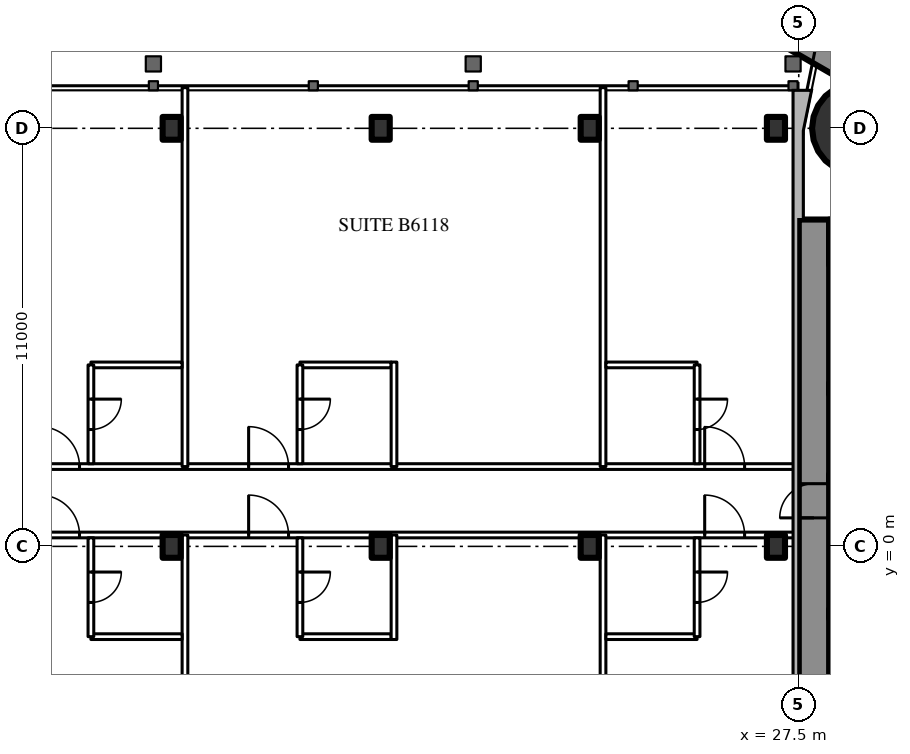
"""IFC4 building model, lengths in metres.
Left out: names, types, materials, properties, quantities, classifications, styles, units other than length and angle.
Written with IfcOpenShell. Run it as: python <this file> out.ifc"""

import sys

from ifc_helpers import new_model, si_unit, direction, frame, frame_2d, origin, origin_2d, place, context, subcontext, project, spatial, rectangle, circle, i_section, extrude, element, fill, save


model = new_model("IFC4")
c1 = context("Model", 3, precision=1e-05, world=origin(), true_north=direction((0.0, 1.0)))
c2 = subcontext(c1, "Body", "Model", "MODEL_VIEW")
j1 = project(units=[si_unit("LENGTHUNIT", "METRE"), si_unit("PLANEANGLEUNIT", "RADIAN")], contexts=[c1])
p1 = place(None, origin())
s1 = spatial("IfcSite", under=j1, at=p1, CompositionType="ELEMENT")
p2 = place(p1, origin())
s2 = spatial("IfcBuilding", under=s1, at=p2, CompositionType="ELEMENT")
p3 = place(p2, frame((0.0, 0.0, 229.7)))
s3 = spatial("IfcBuildingStorey", under=s2, at=p3, CompositionType="ELEMENT", Elevation=229.7)
p4 = place(p3, frame((29.05, 11.0, 0.0), z_axis=(0.0, 0.0, 1.0), x_axis=(1.0, 0.0, 0.0)))
e1 = element("IfcColumn", 1, at=p4, inside=s3, PredefinedType="COLUMN", context=c2, shape_type="SweptSolid", body=[
    extrude(circle(Radius=1.2, at=origin_2d()), origin(), (0.0, 0.0, 1.0), 3.6),
])
p5 = place(p3, frame((27.9, -8.6, 0.0), z_axis=(0.0, 0.0, 1.0), x_axis=(0.0, 1.0, 0.0)))
e2 = element("IfcWall", 2, at=p5, inside=s3, PredefinedType="SHEAR", context=c2, shape_type="SweptSolid", body=[
    extrude(rectangle(XDim=17.2, YDim=0.8, at=frame_2d((8.6, 0.0))), origin(), (0.0, 0.0, 1.0), 3.6),
])
p6 = place(p5, frame((9.35, 0.0, 0.0)))
e3 = element("IfcOpeningElement", 3, at=p6, cuts=e2, PredefinedType="OPENING", context=c2, shape_type="SweptSolid", body=[
    extrude(rectangle(XDim=0.9, YDim=2.2, at=frame_2d((0.45, 1.1))), frame((0.0, 0.41, 0.0), z_axis=(0.0, -1.0, 0.0), x_axis=(1.0, 0.0, 0.0)), (0.0, 0.0, 1.0), 0.82),
])
p7 = place(p3, frame((28.3, 8.0, 0.0), z_axis=(0.0, 0.0, 1.0), x_axis=(1.0, 0.0, 0.0)))
e4 = element("IfcWall", 4, at=p7, inside=s3, PredefinedType="SHEAR", context=c2, shape_type="SweptSolid", body=[
    extrude(rectangle(XDim=8.4, YDim=1.2, at=frame_2d((4.2, 0.0))), origin(), (0.0, 0.0, 1.0), 3.6),
])
p8 = place(p7, frame((0.25, 0.0, 0.0)))
e5 = element("IfcOpeningElement", 5, at=p8, cuts=e4, PredefinedType="OPENING", context=c2, shape_type="SweptSolid", body=[
    extrude(rectangle(XDim=1.0, YDim=2.2, at=frame_2d((0.5, 1.1))), frame((0.0, 0.61, 0.0), z_axis=(0.0, -1.0, 0.0), x_axis=(1.0, 0.0, 0.0)), (0.0, 0.0, 1.0), 1.22),
])
p9 = place(p3, frame((28.3, 4.15, 0.0), z_axis=(0.0, 0.0, 1.0), x_axis=(1.0, 0.0, 0.0)))
e6 = element("IfcWall", 6, at=p9, inside=s3, PredefinedType="SHEAR", context=c2, shape_type="SweptSolid", body=[
    extrude(rectangle(XDim=8.4, YDim=0.3, at=frame_2d((4.2, 0.0))), origin(), (0.0, 0.0, 1.0), 3.6),
])
for number, where, z_axis, x_axis in (
    (7, (28.3, -1.775, 0.0), (0.0, 0.0, 1.0), (1.0, 0.0, 0.0)),
    (8, (28.3, 1.775, 0.0), (0.0, 0.0, 1.0), (1.0, 0.0, 0.0)),
):
    element("IfcWall", number, at=place(p3, frame(where, z_axis=z_axis, x_axis=x_axis)), inside=s3, PredefinedType="SHEAR", context=c2, shape_type="SweptSolid", body=[
        extrude(rectangle(XDim=2.9, YDim=0.25, at=frame_2d((1.45, 0.0))), origin(), (0.0, 0.0, 1.0), 3.6),
    ])
p10 = place(p3, frame((27.2, -13.8, 0.0), z_axis=(0.0, 0.0, 1.0), x_axis=(0.866027159892, 0.499996958321, 0.0)))
e9 = element("IfcWall", 9, at=p10, inside=s3, PredefinedType="SHEAR", context=c2, shape_type="SweptSolid", body=[
    extrude(rectangle(XDim=27.947, YDim=1.2, at=frame_2d((13.973, 0.0))), origin(), (0.0, 0.0, 1.0), 3.6),
])
p11 = place(p10, frame((4.6, 0.0, 0.0)))
e10 = element("IfcOpeningElement", 10, at=p11, cuts=e9, PredefinedType="OPENING", context=c2, shape_type="SweptSolid", body=[
    extrude(rectangle(XDim=1.0, YDim=2.2, at=frame_2d((0.5, 1.1))), frame((0.0, 0.61, 0.0), z_axis=(0.0, -1.0, 0.0), x_axis=(1.0, 0.0, 0.0)), (0.0, 0.0, 1.0), 1.22),
])
p12 = place(p10, frame((13.395, 0.0, 0.0)))
e11 = element("IfcOpeningElement", 11, at=p12, cuts=e9, PredefinedType="OPENING", context=c2, shape_type="SweptSolid", body=[
    extrude(rectangle(XDim=1.8, YDim=2.2, at=frame_2d((0.9, 1.1))), frame((0.0, 0.61, 0.0), z_axis=(0.0, -1.0, 0.0), x_axis=(1.0, 0.0, 0.0)), (0.0, 0.0, 1.0), 1.22),
])
p13 = place(p3, frame((27.2, 13.8, 0.0), z_axis=(0.0, 0.0, 1.0), x_axis=(0.866024515034, -0.500001539357, 0.0)))
e12 = element("IfcWall", 12, at=p13, inside=s3, PredefinedType="SHEAR", context=c2, shape_type="SweptSolid", body=[
    extrude(rectangle(XDim=26.907, YDim=1.2, at=frame_2d((13.454, 0.0))), origin(), (0.0, 0.0, 1.0), 3.6),
])
p14 = place(p13, frame((4.6, 0.0, 0.0)))
e13 = element("IfcOpeningElement", 13, at=p14, cuts=e12, PredefinedType="OPENING", context=c2, shape_type="SweptSolid", body=[
    extrude(rectangle(XDim=1.0, YDim=2.2, at=frame_2d((0.5, 1.1))), frame((0.0, 0.61, 0.0), z_axis=(0.0, -1.0, 0.0), x_axis=(1.0, 0.0, 0.0)), (0.0, 0.0, 1.0), 1.22),
])
p15 = place(p13, frame((13.395, 0.0, 0.0)))
e14 = element("IfcOpeningElement", 14, at=p15, cuts=e12, PredefinedType="OPENING", context=c2, shape_type="SweptSolid", body=[
    extrude(rectangle(XDim=1.8, YDim=2.2, at=frame_2d((0.9, 1.1))), frame((0.0, 0.61, 0.0), z_axis=(0.0, -1.0, 0.0), x_axis=(1.0, 0.0, 0.0)), (0.0, 0.0, 1.0), 1.22),
])
for number, where, z_axis, x_axis in (
    (15, (11.0, 0.0, 0.0), (0.0, 0.0, 1.0), (1.0, 0.0, 0.0)),
    (16, (16.5, 0.0, 0.0), (0.0, 0.0, 1.0), (1.0, 0.0, 0.0)),
    (17, (22.0, 0.0, 0.0), (0.0, 0.0, 1.0), (1.0, 0.0, 0.0)),
    (18, (26.9, 0.0, 0.0), (0.0, 0.0, 1.0), (1.0, 0.0, 0.0)),
    (19, (11.0, 11.0, 0.0), (0.0, 0.0, 1.0), (1.0, 0.0, 0.0)),
    (20, (16.5, 11.0, 0.0), (0.0, 0.0, 1.0), (1.0, 0.0, 0.0)),
    (21, (22.0, 11.0, 0.0), (0.0, 0.0, 1.0), (1.0, 0.0, 0.0)),
    (22, (26.9, 11.0, 0.0), (0.0, 0.0, 1.0), (1.0, 0.0, 0.0)),
):
    element("IfcColumn", number, at=place(p3, frame(where, z_axis=z_axis, x_axis=x_axis)), inside=s3, PredefinedType="COLUMN", context=c2, shape_type="SweptSolid", body=[
        extrude(i_section(OverallWidth=0.476, OverallDepth=0.6, WebThickness=0.1, FlangeThickness=0.14, FilletRadius=0.02, at=origin_2d()), origin(), (0.0, 0.0, 1.0), 3.6),
    ])
p16 = place(p3, frame((-27.5, 0.3, 0.0), z_axis=(0.0, 0.0, 1.0), x_axis=(1.0, 0.0, 0.0)))
e23 = element("IfcWall", 23, at=p16, inside=s3, PredefinedType="PARTITIONING", context=c2, shape_type="SweptSolid", body=[
    extrude(rectangle(XDim=55.0, YDim=0.15, at=frame_2d((27.5, 0.0))), origin(), (0.0, 0.0, 1.0), 2.4),
])
p17 = place(p16, frame((1.575, 0.0, 0.0)))
e24 = element("IfcOpeningElement", 24, at=p17, cuts=e23, PredefinedType="OPENING", context=c2, shape_type="SweptSolid", body=[
    extrude(rectangle(XDim=1.0, YDim=2.2, at=frame_2d((0.5, 1.1))), frame((0.0, 0.085, 0.0), z_axis=(0.0, -1.0, 0.0), x_axis=(1.0, 0.0, 0.0)), (0.0, 0.0, 1.0), 0.17),
])
p18 = place(p16, frame((7.525, 0.0, 0.0)))
e25 = element("IfcOpeningElement", 25, at=p18, cuts=e23, PredefinedType="OPENING", context=c2, shape_type="SweptSolid", body=[
    extrude(rectangle(XDim=1.05, YDim=2.4, at=frame_2d((0.525, 1.2))), frame((0.0, 0.085, 0.0), z_axis=(0.0, -1.0, 0.0), x_axis=(1.0, 0.0, 0.0)), (0.0, 0.0, 1.0), 0.17),
])
p19 = place(p16, frame((18.525, 0.0, 0.0)))
e26 = element("IfcOpeningElement", 26, at=p19, cuts=e23, PredefinedType="OPENING", context=c2, shape_type="SweptSolid", body=[
    extrude(rectangle(XDim=1.05, YDim=2.4, at=frame_2d((0.525, 1.2))), frame((0.0, 0.085, 0.0), z_axis=(0.0, -1.0, 0.0), x_axis=(1.0, 0.0, 0.0)), (0.0, 0.0, 1.0), 0.17),
])
p20 = place(p16, frame((24.025, 0.0, 0.0)))
e27 = element("IfcOpeningElement", 27, at=p20, cuts=e23, PredefinedType="OPENING", context=c2, shape_type="SweptSolid", body=[
    extrude(rectangle(XDim=1.05, YDim=2.4, at=frame_2d((0.525, 1.2))), frame((0.0, 0.085, 0.0), z_axis=(0.0, -1.0, 0.0), x_axis=(1.0, 0.0, 0.0)), (0.0, 0.0, 1.0), 0.17),
])
p21 = place(p16, frame((35.025, 0.0, 0.0)))
e28 = element("IfcOpeningElement", 28, at=p21, cuts=e23, PredefinedType="OPENING", context=c2, shape_type="SweptSolid", body=[
    extrude(rectangle(XDim=1.05, YDim=2.4, at=frame_2d((0.525, 1.2))), frame((0.0, 0.085, 0.0), z_axis=(0.0, -1.0, 0.0), x_axis=(1.0, 0.0, 0.0)), (0.0, 0.0, 1.0), 0.17),
])
p22 = place(p16, frame((40.525, 0.0, 0.0)))
e29 = element("IfcOpeningElement", 29, at=p22, cuts=e23, PredefinedType="OPENING", context=c2, shape_type="SweptSolid", body=[
    extrude(rectangle(XDim=1.05, YDim=2.4, at=frame_2d((0.525, 1.2))), frame((0.0, 0.085, 0.0), z_axis=(0.0, -1.0, 0.0), x_axis=(1.0, 0.0, 0.0)), (0.0, 0.0, 1.0), 0.17),
])
p23 = place(p16, frame((52.525, 0.0, 0.0)))
e30 = element("IfcOpeningElement", 30, at=p23, cuts=e23, PredefinedType="OPENING", context=c2, shape_type="SweptSolid", body=[
    extrude(rectangle(XDim=1.05, YDim=2.4, at=frame_2d((0.525, 1.2))), frame((0.0, 0.085, 0.0), z_axis=(0.0, -1.0, 0.0), x_axis=(1.0, 0.0, 0.0)), (0.0, 0.0, 1.0), 0.17),
])
p24 = place(p3, frame((5.85, 2.1, 0.0), z_axis=(0.0, 0.0, 1.0), x_axis=(1.0, 0.0, 0.0)))
e31 = element("IfcWall", 31, at=p24, inside=s3, PredefinedType="PARTITIONING", context=c2, shape_type="SweptSolid", body=[
    extrude(rectangle(XDim=21.65, YDim=0.15, at=frame_2d((10.825, 0.0))), origin(), (0.0, 0.0, 1.0), 3.4),
])
p25 = place(p24, frame((1.675, 0.0, 0.0)))
e32 = element("IfcOpeningElement", 32, at=p25, cuts=e31, PredefinedType="OPENING", context=c2, shape_type="SweptSolid", body=[
    extrude(rectangle(XDim=1.05, YDim=2.4, at=frame_2d((0.525, 1.2))), frame((0.0, 0.085, 0.0), z_axis=(0.0, -1.0, 0.0), x_axis=(1.0, 0.0, 0.0)), (0.0, 0.0, 1.0), 0.17),
])
p26 = place(p24, frame((7.175, 0.0, 0.0)))
e33 = element("IfcOpeningElement", 33, at=p26, cuts=e31, PredefinedType="OPENING", context=c2, shape_type="SweptSolid", body=[
    extrude(rectangle(XDim=1.05, YDim=2.4, at=frame_2d((0.525, 1.2))), frame((0.0, 0.085, 0.0), z_axis=(0.0, -1.0, 0.0), x_axis=(1.0, 0.0, 0.0)), (0.0, 0.0, 1.0), 0.17),
])
p27 = place(p24, frame((19.175, 0.0, 0.0)))
e34 = element("IfcOpeningElement", 34, at=p27, cuts=e31, PredefinedType="OPENING", context=c2, shape_type="SweptSolid", body=[
    extrude(rectangle(XDim=1.05, YDim=2.4, at=frame_2d((0.525, 1.2))), frame((0.0, 0.085, 0.0), z_axis=(0.0, -1.0, 0.0), x_axis=(1.0, 0.0, 0.0)), (0.0, 0.0, 1.0), 0.17),
])
for number, where, z_axis, x_axis in (
    (35, (11.35, -12.07, 0.0), (0.0, 0.0, 1.0), (0.0, 1.0, 0.0)),
    (36, (22.35, -12.07, 0.0), (0.0, 0.0, 1.0), (0.0, 1.0, 0.0)),
):
    element("IfcWall", number, at=place(p3, frame(where, z_axis=z_axis, x_axis=x_axis)), inside=s3, PredefinedType="PARTITIONING", context=c2, shape_type="SweptSolid", body=[
        extrude(rectangle(XDim=12.37, YDim=0.15, at=frame_2d((6.185, 0.0))), origin(), (0.0, 0.0, 1.0), 3.4),
    ])
p28 = place(p3, frame((8.875, -2.375, 0.0), z_axis=(0.0, 0.0, 1.0), x_axis=(1.0, 0.0, 0.0)))
e37 = element("IfcWall", 37, at=p28, inside=s3, PredefinedType="PARTITIONING", context=c2, shape_type="SweptSolid", body=[
    extrude(rectangle(XDim=2.4, YDim=0.15, at=frame_2d((1.2, 0.0))), origin(), (0.0, 0.0, 1.0), 3.4),
])
p29 = place(p3, frame((8.875, -2.375, 0.0), z_axis=(0.0, 0.0, 1.0), x_axis=(0.0, 1.0, 0.0)))
e38 = element("IfcWall", 38, at=p29, inside=s3, PredefinedType="PARTITIONING", context=c2, shape_type="SweptSolid", body=[
    extrude(rectangle(XDim=2.6, YDim=0.15, at=frame_2d((1.3, 0.0))), origin(), (0.0, 0.0, 1.0), 3.4),
])
p30 = place(p29, frame((0.9, 0.0, 0.0)))
e39 = element("IfcOpeningElement", 39, at=p30, cuts=e38, PredefinedType="OPENING", context=c2, shape_type="SweptSolid", body=[
    extrude(rectangle(XDim=0.8, YDim=2.2, at=frame_2d((0.4, 1.1))), frame((0.0, 0.085, 0.0), z_axis=(0.0, -1.0, 0.0), x_axis=(1.0, 0.0, 0.0)), (0.0, 0.0, 1.0), 0.17),
])
p31 = place(p3, frame((14.375, -2.375, 0.0), z_axis=(0.0, 0.0, 1.0), x_axis=(1.0, 0.0, 0.0)))
e40 = element("IfcWall", 40, at=p31, inside=s3, PredefinedType="PARTITIONING", context=c2, shape_type="SweptSolid", body=[
    extrude(rectangle(XDim=2.4, YDim=0.15, at=frame_2d((1.2, 0.0))), origin(), (0.0, 0.0, 1.0), 3.4),
])
p32 = place(p3, frame((14.375, -2.375, 0.0), z_axis=(0.0, 0.0, 1.0), x_axis=(0.0, 1.0, 0.0)))
e41 = element("IfcWall", 41, at=p32, inside=s3, PredefinedType="PARTITIONING", context=c2, shape_type="SweptSolid", body=[
    extrude(rectangle(XDim=2.6, YDim=0.15, at=frame_2d((1.3, 0.0))), origin(), (0.0, 0.0, 1.0), 3.4),
])
p33 = place(p32, frame((0.9, 0.0, 0.0)))
e42 = element("IfcOpeningElement", 42, at=p33, cuts=e41, PredefinedType="OPENING", context=c2, shape_type="SweptSolid", body=[
    extrude(rectangle(XDim=0.8, YDim=2.2, at=frame_2d((0.4, 1.1))), frame((0.0, 0.085, 0.0), z_axis=(0.0, -1.0, 0.0), x_axis=(1.0, 0.0, 0.0)), (0.0, 0.0, 1.0), 0.17),
])
p34 = place(p3, frame((22.425, -2.375, 0.0), z_axis=(0.0, 0.0, 1.0), x_axis=(1.0, 0.0, 0.0)))
e43 = element("IfcWall", 43, at=p34, inside=s3, PredefinedType="PARTITIONING", context=c2, shape_type="SweptSolid", body=[
    extrude(rectangle(XDim=2.4, YDim=0.15, at=frame_2d((1.2, 0.0))), origin(), (0.0, 0.0, 1.0), 3.4),
])
p35 = place(p3, frame((24.825, -2.375, 0.0), z_axis=(0.0, 0.0, 1.0), x_axis=(0.0, 1.0, 0.0)))
e44 = element("IfcWall", 44, at=p35, inside=s3, PredefinedType="PARTITIONING", context=c2, shape_type="SweptSolid", body=[
    extrude(rectangle(XDim=2.6, YDim=0.15, at=frame_2d((1.3, 0.0))), origin(), (0.0, 0.0, 1.0), 3.4),
])
p36 = place(p35, frame((0.9, 0.0, 0.0)))
e45 = element("IfcOpeningElement", 45, at=p36, cuts=e44, PredefinedType="OPENING", context=c2, shape_type="SweptSolid", body=[
    extrude(rectangle(XDim=0.8, YDim=2.2, at=frame_2d((0.4, 1.1))), frame((0.0, 0.085, 0.0), z_axis=(0.0, -1.0, 0.0), x_axis=(1.0, 0.0, 0.0)), (0.0, 0.0, 1.0), 0.17),
])
for number, where, z_axis, x_axis in (
    (46, (11.35, 2.1, 0.0), (0.0, 0.0, 1.0), (0.0, 1.0, 0.0)),
    (47, (22.35, 2.1, 0.0), (0.0, 0.0, 1.0), (0.0, 1.0, 0.0)),
):
    element("IfcWall", number, at=place(p3, frame(where, z_axis=z_axis, x_axis=x_axis)), inside=s3, PredefinedType="PARTITIONING", context=c2, shape_type="SweptSolid", body=[
        extrude(rectangle(XDim=9.97, YDim=0.15, at=frame_2d((4.985, 0.0))), origin(), (0.0, 0.0, 1.0), 3.4),
    ])
p37 = place(p3, frame((8.875, 4.775, 0.0), z_axis=(0.0, 0.0, 1.0), x_axis=(1.0, 0.0, 0.0)))
e48 = element("IfcWall", 48, at=p37, inside=s3, PredefinedType="PARTITIONING", context=c2, shape_type="SweptSolid", body=[
    extrude(rectangle(XDim=2.4, YDim=0.15, at=frame_2d((1.2, 0.0))), origin(), (0.0, 0.0, 1.0), 3.4),
])
p38 = place(p3, frame((8.875, 2.175, 0.0), z_axis=(0.0, 0.0, 1.0), x_axis=(0.0, 1.0, 0.0)))
e49 = element("IfcWall", 49, at=p38, inside=s3, PredefinedType="PARTITIONING", context=c2, shape_type="SweptSolid", body=[
    extrude(rectangle(XDim=2.6, YDim=0.15, at=frame_2d((1.3, 0.0))), origin(), (0.0, 0.0, 1.0), 3.4),
])
p39 = place(p38, frame((0.9, 0.0, 0.0)))
e50 = element("IfcOpeningElement", 50, at=p39, cuts=e49, PredefinedType="OPENING", context=c2, shape_type="SweptSolid", body=[
    extrude(rectangle(XDim=0.8, YDim=2.2, at=frame_2d((0.4, 1.1))), frame((0.0, 0.085, 0.0), z_axis=(0.0, -1.0, 0.0), x_axis=(1.0, 0.0, 0.0)), (0.0, 0.0, 1.0), 0.17),
])
p40 = place(p3, frame((14.375, 4.775, 0.0), z_axis=(0.0, 0.0, 1.0), x_axis=(1.0, 0.0, 0.0)))
e51 = element("IfcWall", 51, at=p40, inside=s3, PredefinedType="PARTITIONING", context=c2, shape_type="SweptSolid", body=[
    extrude(rectangle(XDim=2.4, YDim=0.15, at=frame_2d((1.2, 0.0))), origin(), (0.0, 0.0, 1.0), 3.4),
])
p41 = place(p3, frame((14.375, 2.175, 0.0), z_axis=(0.0, 0.0, 1.0), x_axis=(0.0, 1.0, 0.0)))
e52 = element("IfcWall", 52, at=p41, inside=s3, PredefinedType="PARTITIONING", context=c2, shape_type="SweptSolid", body=[
    extrude(rectangle(XDim=2.6, YDim=0.15, at=frame_2d((1.3, 0.0))), origin(), (0.0, 0.0, 1.0), 3.4),
])
p42 = place(p41, frame((0.9, 0.0, 0.0)))
e53 = element("IfcOpeningElement", 53, at=p42, cuts=e52, PredefinedType="OPENING", context=c2, shape_type="SweptSolid", body=[
    extrude(rectangle(XDim=0.8, YDim=2.2, at=frame_2d((0.4, 1.1))), frame((0.0, 0.085, 0.0), z_axis=(0.0, -1.0, 0.0), x_axis=(1.0, 0.0, 0.0)), (0.0, 0.0, 1.0), 0.17),
])
p43 = place(p3, frame((22.425, 4.775, 0.0), z_axis=(0.0, 0.0, 1.0), x_axis=(1.0, 0.0, 0.0)))
e54 = element("IfcWall", 54, at=p43, inside=s3, PredefinedType="PARTITIONING", context=c2, shape_type="SweptSolid", body=[
    extrude(rectangle(XDim=2.4, YDim=0.15, at=frame_2d((1.2, 0.0))), origin(), (0.0, 0.0, 1.0), 3.4),
])
p44 = place(p3, frame((24.825, 2.175, 0.0), z_axis=(0.0, 0.0, 1.0), x_axis=(0.0, 1.0, 0.0)))
e55 = element("IfcWall", 55, at=p44, inside=s3, PredefinedType="PARTITIONING", context=c2, shape_type="SweptSolid", body=[
    extrude(rectangle(XDim=2.6, YDim=0.15, at=frame_2d((1.3, 0.0))), origin(), (0.0, 0.0, 1.0), 3.4),
])
p45 = place(p44, frame((0.9, 0.0, 0.0)))
e56 = element("IfcOpeningElement", 56, at=p45, cuts=e55, PredefinedType="OPENING", context=c2, shape_type="SweptSolid", body=[
    extrude(rectangle(XDim=0.8, YDim=2.2, at=frame_2d((0.4, 1.1))), frame((0.0, 0.085, 0.0), z_axis=(0.0, -1.0, 0.0), x_axis=(1.0, 0.0, 0.0)), (0.0, 0.0, 1.0), 0.17),
])
for number, where, z_axis, x_axis in (
    (57, (16.85, -2.45, 0.0), (0.0, 0.0, 1.0), (0.0, 1.0, 0.0)),
    (58, (16.85, 2.1, 0.0), (0.0, 0.0, 1.0), (0.0, 1.0, 0.0)),
):
    element("IfcWall", number, at=place(p3, frame(where, z_axis=z_axis, x_axis=x_axis)), inside=s3, PredefinedType="PARTITIONING", context=c2, shape_type="SweptSolid", body=[
        extrude(rectangle(XDim=2.75, YDim=0.15, at=frame_2d((1.375, 0.0))), origin(), (0.0, 0.0, 1.0), 3.4),
    ])
p46 = place(p6, origin())
e59 = element("IfcDoor", 59, at=p46, inside=s3, OperationType="SINGLE_SWING_LEFT", PredefinedType="DOOR", context=c2, shape_type="SweptSolid", body=[
    extrude(rectangle(XDim=0.9, YDim=2.2, at=frame_2d((0.45, 1.1))), frame((0.0, 0.025, 0.0), z_axis=(0.0, -1.0, 0.0), x_axis=(1.0, 0.0, 0.0)), (0.0, 0.0, 1.0), 0.05),
])
fill(e3, e59)
p47 = place(p30, origin())
e60 = element("IfcDoor", 60, at=p47, inside=s3, OperationType="SINGLE_SWING_RIGHT", PredefinedType="DOOR", context=c2, shape_type="SweptSolid", body=[
    extrude(rectangle(XDim=0.8, YDim=2.2, at=frame_2d((0.4, 1.1))), frame((0.0, 0.025, 0.0), z_axis=(0.0, -1.0, 0.0), x_axis=(1.0, 0.0, 0.0)), (0.0, 0.0, 1.0), 0.05),
])
fill(e39, e60)
p48 = place(p21, origin())
e61 = element("IfcDoor", 61, at=p48, inside=s3, OperationType="SINGLE_SWING_LEFT", PredefinedType="DOOR", context=c2, shape_type="SweptSolid", body=[
    extrude(rectangle(XDim=1.05, YDim=2.4, at=frame_2d((0.525, 1.2))), frame((0.0, 0.025, 0.0), z_axis=(0.0, -1.0, 0.0), x_axis=(1.0, 0.0, 0.0)), (0.0, 0.0, 1.0), 0.05),
])
fill(e28, e61)
p49 = place(p33, origin())
e62 = element("IfcDoor", 62, at=p49, inside=s3, OperationType="SINGLE_SWING_RIGHT", PredefinedType="DOOR", context=c2, shape_type="SweptSolid", body=[
    extrude(rectangle(XDim=0.8, YDim=2.2, at=frame_2d((0.4, 1.1))), frame((0.0, 0.025, 0.0), z_axis=(0.0, -1.0, 0.0), x_axis=(1.0, 0.0, 0.0)), (0.0, 0.0, 1.0), 0.05),
])
fill(e42, e62)
p50 = place(p22, origin())
e63 = element("IfcDoor", 63, at=p50, inside=s3, OperationType="SINGLE_SWING_LEFT", PredefinedType="DOOR", context=c2, shape_type="SweptSolid", body=[
    extrude(rectangle(XDim=1.05, YDim=2.4, at=frame_2d((0.525, 1.2))), frame((0.0, 0.025, 0.0), z_axis=(0.0, -1.0, 0.0), x_axis=(1.0, 0.0, 0.0)), (0.0, 0.0, 1.0), 0.05),
])
fill(e29, e63)
p51 = place(p36, origin())
e64 = element("IfcDoor", 64, at=p51, inside=s3, OperationType="SINGLE_SWING_RIGHT", PredefinedType="DOOR", context=c2, shape_type="SweptSolid", body=[
    extrude(rectangle(XDim=0.8, YDim=2.2, at=frame_2d((0.4, 1.1))), frame((0.0, 0.025, 0.0), z_axis=(0.0, -1.0, 0.0), x_axis=(1.0, 0.0, 0.0)), (0.0, 0.0, 1.0), 0.05),
])
fill(e45, e64)
p52 = place(p23, origin())
e65 = element("IfcDoor", 65, at=p52, inside=s3, OperationType="SINGLE_SWING_LEFT", PredefinedType="DOOR", context=c2, shape_type="SweptSolid", body=[
    extrude(rectangle(XDim=1.05, YDim=2.4, at=frame_2d((0.525, 1.2))), frame((0.0, 0.025, 0.0), z_axis=(0.0, -1.0, 0.0), x_axis=(1.0, 0.0, 0.0)), (0.0, 0.0, 1.0), 0.05),
])
fill(e30, e65)
p53 = place(p39, origin())
e66 = element("IfcDoor", 66, at=p53, inside=s3, OperationType="SINGLE_SWING_RIGHT", PredefinedType="DOOR", context=c2, shape_type="SweptSolid", body=[
    extrude(rectangle(XDim=0.8, YDim=2.2, at=frame_2d((0.4, 1.1))), frame((0.0, 0.025, 0.0), z_axis=(0.0, -1.0, 0.0), x_axis=(1.0, 0.0, 0.0)), (0.0, 0.0, 1.0), 0.05),
])
fill(e50, e66)
p54 = place(p25, origin())
e67 = element("IfcDoor", 67, at=p54, inside=s3, OperationType="SINGLE_SWING_LEFT", PredefinedType="DOOR", context=c2, shape_type="SweptSolid", body=[
    extrude(rectangle(XDim=1.05, YDim=2.4, at=frame_2d((0.525, 1.2))), frame((0.0, 0.025, 0.0), z_axis=(0.0, -1.0, 0.0), x_axis=(1.0, 0.0, 0.0)), (0.0, 0.0, 1.0), 0.05),
])
fill(e32, e67)
p55 = place(p42, origin())
e68 = element("IfcDoor", 68, at=p55, inside=s3, OperationType="SINGLE_SWING_RIGHT", PredefinedType="DOOR", context=c2, shape_type="SweptSolid", body=[
    extrude(rectangle(XDim=0.8, YDim=2.2, at=frame_2d((0.4, 1.1))), frame((0.0, 0.025, 0.0), z_axis=(0.0, -1.0, 0.0), x_axis=(1.0, 0.0, 0.0)), (0.0, 0.0, 1.0), 0.05),
])
fill(e53, e68)
p56 = place(p26, origin())
e69 = element("IfcDoor", 69, at=p56, inside=s3, OperationType="SINGLE_SWING_LEFT", PredefinedType="DOOR", context=c2, shape_type="SweptSolid", body=[
    extrude(rectangle(XDim=1.05, YDim=2.4, at=frame_2d((0.525, 1.2))), frame((0.0, 0.025, 0.0), z_axis=(0.0, -1.0, 0.0), x_axis=(1.0, 0.0, 0.0)), (0.0, 0.0, 1.0), 0.05),
])
fill(e33, e69)
p57 = place(p45, origin())
e70 = element("IfcDoor", 70, at=p57, inside=s3, OperationType="SINGLE_SWING_RIGHT", PredefinedType="DOOR", context=c2, shape_type="SweptSolid", body=[
    extrude(rectangle(XDim=0.8, YDim=2.2, at=frame_2d((0.4, 1.1))), frame((0.0, 0.025, 0.0), z_axis=(0.0, -1.0, 0.0), x_axis=(1.0, 0.0, 0.0)), (0.0, 0.0, 1.0), 0.05),
])
fill(e56, e70)
p58 = place(p27, origin())
e71 = element("IfcDoor", 71, at=p58, inside=s3, OperationType="SINGLE_SWING_LEFT", PredefinedType="DOOR", context=c2, shape_type="SweptSolid", body=[
    extrude(rectangle(XDim=1.05, YDim=2.4, at=frame_2d((0.525, 1.2))), frame((0.0, 0.025, 0.0), z_axis=(0.0, -1.0, 0.0), x_axis=(1.0, 0.0, 0.0)), (0.0, 0.0, 1.0), 0.05),
])
fill(e34, e71)
save(model, sys.argv[1])
